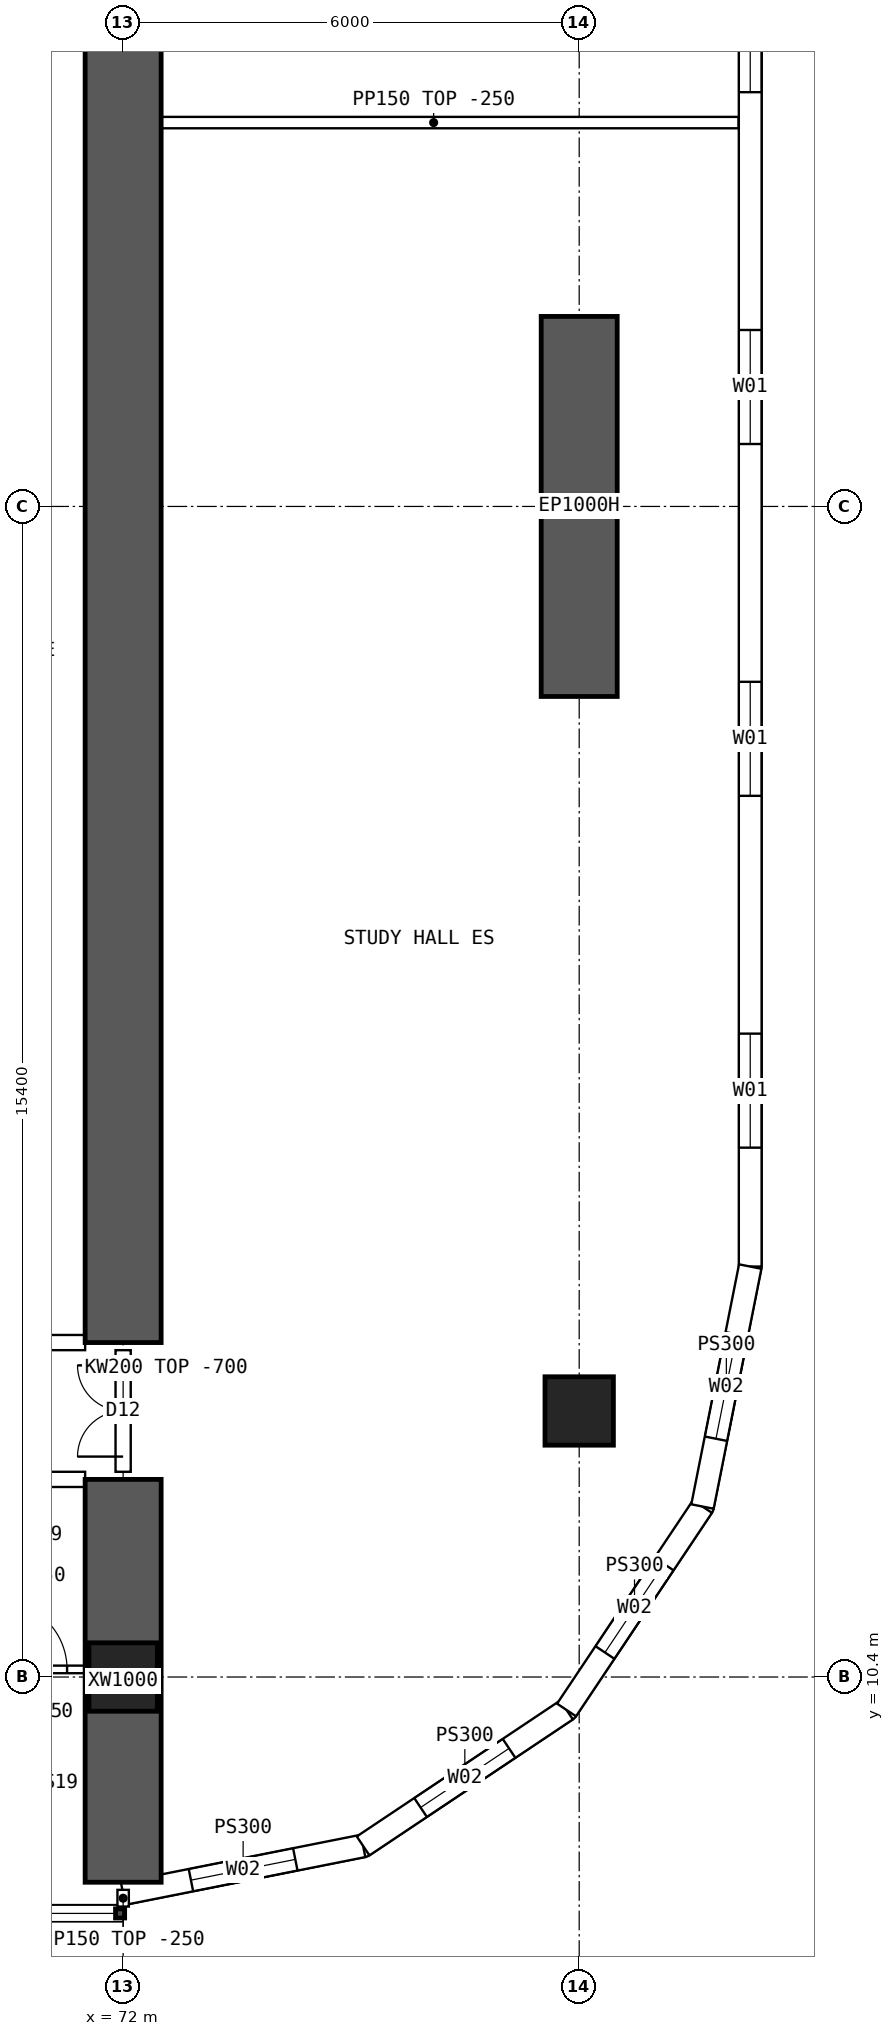
"""IFC4 building model, lengths in metres.
Left out: names, types, materials, properties, quantities, classifications, styles, units other than length and angle.
Written with IfcOpenShell. Run it as: python <this file> out.ifc"""

import sys

from ifc_helpers import new_model, si_unit, direction, frame, frame_2d, origin, origin_2d, place, context, subcontext, project, spatial, polyline, rectangle, hollow_rectangle, outline, extrude, element, fill, save


model = new_model("IFC4")
c1 = context("Model", 3, precision=1e-05, world=origin(), true_north=direction((0.0, 1.0)))
c2 = subcontext(c1, "Body", "Model", "MODEL_VIEW")
j1 = project(units=[si_unit("LENGTHUNIT", "METRE"), si_unit("PLANEANGLEUNIT", "RADIAN")], contexts=[c1])
p1 = place(None, origin())
s1 = spatial("IfcSite", under=j1, at=p1, CompositionType="ELEMENT")
p2 = place(p1, origin())
s2 = spatial("IfcBuilding", under=s1, at=p2, CompositionType="ELEMENT")
p3 = place(p2, frame((0.0, 0.0, 27.7)))
s3 = spatial("IfcBuildingStorey", under=s2, at=p3, CompositionType="ELEMENT", Elevation=27.7)
for number, where, z_axis, x_axis in (
    (1, (72.0, 10.4, 0.0), (0.0, 0.0, 1.0), (1.0, 0.0, 0.0)),
    (2, (78.0, 13.9, 0.0), (0.0, 0.0, 1.0), (1.0, 0.0, 0.0)),
):
    element("IfcColumn", number, at=place(p3, frame(where, z_axis=z_axis, x_axis=x_axis)), inside=s3, PredefinedType="COLUMN", context=c2, shape_type="SweptSolid", body=[
        extrude(hollow_rectangle(XDim=0.9, YDim=0.9, WallThickness=0.09, at=origin_2d()), origin(), (0.0, 0.0, 1.0), 3.75),
    ])
p4 = place(p3, frame((78.0, 23.3, 0.0), z_axis=(0.0, 0.0, 1.0), x_axis=(0.0, 1.0, 0.0)))
e3 = element("IfcWall", 3, at=p4, inside=s3, PredefinedType="SHEAR", context=c2, shape_type="SweptSolid", body=[
    extrude(rectangle(XDim=5.0, YDim=1.0, at=frame_2d((2.5, 0.0))), origin(), (0.0, 0.0, 1.0), 3.75),
])
p5 = place(p3, frame((72.0, 7.7, 0.0), z_axis=(0.0, 0.0, 1.0), x_axis=(0.0, 1.0, 0.0)))
e4 = element("IfcWall", 4, at=p5, inside=s3, PredefinedType="SHEAR", context=c2, shape_type="SweptSolid", body=[
    extrude(rectangle(XDim=5.3, YDim=1.0, at=frame_2d((2.65, 0.0))), origin(), (0.0, 0.0, 1.0), 3.75),
])
p6 = place(p3, frame((72.0, 14.8, 0.0), z_axis=(0.0, 0.0, 1.0), x_axis=(0.0, 1.0, 0.0)))
e5 = element("IfcWall", 5, at=p6, inside=s3, PredefinedType="SHEAR", context=c2, shape_type="SweptSolid", body=[
    extrude(rectangle(XDim=34.4, YDim=1.0, at=frame_2d((17.2, 0.0))), origin(), (0.0, 0.0, 1.0), 3.75),
])
p7 = place(p3, frame((80.25, 15.8, 0.0), z_axis=(0.0, 0.0, 1.0), x_axis=(0.0, 1.0, 0.0)))
e6 = element("IfcWall", 6, at=p7, inside=s3, PredefinedType="SOLIDWALL", context=c2, shape_type="SweptSolid", body=[
    extrude(outline(polyline([(-0.015, -0.15), (32.415, -0.15), (32.385, 0.15), (0.015, 0.15), (-0.015, -0.15)])), origin(), (0.0, 0.0, 1.0), 3.5),
])
p8 = place(p7, frame((1.564, 0.0, 0.9)))
e7 = element("IfcOpeningElement", 7, at=p8, cuts=e6, PredefinedType="OPENING", context=c2, shape_type="SweptSolid", body=[
    extrude(rectangle(XDim=1.5, YDim=2.0, at=frame_2d((0.75, 1.0))), frame((0.0, 0.16, 0.0), z_axis=(0.0, -1.0, 0.0), x_axis=(1.0, 0.0, 0.0)), (0.0, 0.0, 1.0), 0.32),
])
p9 = place(p7, frame((6.193, 0.0, 0.9)))
e8 = element("IfcOpeningElement", 8, at=p9, cuts=e6, PredefinedType="OPENING", context=c2, shape_type="SweptSolid", body=[
    extrude(rectangle(XDim=1.5, YDim=2.0, at=frame_2d((0.75, 1.0))), frame((0.0, 0.16, 0.0), z_axis=(0.0, -1.0, 0.0), x_axis=(1.0, 0.0, 0.0)), (0.0, 0.0, 1.0), 0.32),
])
p10 = place(p7, frame((10.822, 0.0, 0.9)))
e9 = element("IfcOpeningElement", 9, at=p10, cuts=e6, PredefinedType="OPENING", context=c2, shape_type="SweptSolid", body=[
    extrude(rectangle(XDim=1.5, YDim=2.0, at=frame_2d((0.75, 1.0))), frame((0.0, 0.16, 0.0), z_axis=(0.0, -1.0, 0.0), x_axis=(1.0, 0.0, 0.0)), (0.0, 0.0, 1.0), 0.32),
])
p11 = place(p7, frame((15.45, 0.0, 0.9)))
e10 = element("IfcOpeningElement", 10, at=p11, cuts=e6, PredefinedType="OPENING", context=c2, shape_type="SweptSolid", body=[
    extrude(rectangle(XDim=1.5, YDim=2.0, at=frame_2d((0.75, 1.0))), frame((0.0, 0.16, 0.0), z_axis=(0.0, -1.0, 0.0), x_axis=(1.0, 0.0, 0.0)), (0.0, 0.0, 1.0), 0.32),
])
p12 = place(p7, frame((20.079, 0.0, 0.9)))
e11 = element("IfcOpeningElement", 11, at=p12, cuts=e6, PredefinedType="OPENING", context=c2, shape_type="SweptSolid", body=[
    extrude(rectangle(XDim=1.5, YDim=2.0, at=frame_2d((0.75, 1.0))), frame((0.0, 0.16, 0.0), z_axis=(0.0, -1.0, 0.0), x_axis=(1.0, 0.0, 0.0)), (0.0, 0.0, 1.0), 0.32),
])
p13 = place(p7, frame((24.707, 0.0, 0.9)))
e12 = element("IfcOpeningElement", 12, at=p13, cuts=e6, PredefinedType="OPENING", context=c2, shape_type="SweptSolid", body=[
    extrude(rectangle(XDim=1.5, YDim=2.0, at=frame_2d((0.75, 1.0))), frame((0.0, 0.16, 0.0), z_axis=(0.0, -1.0, 0.0), x_axis=(1.0, 0.0, 0.0)), (0.0, 0.0, 1.0), 0.32),
])
p14 = place(p7, frame((29.336, 0.0, 0.9)))
e13 = element("IfcOpeningElement", 13, at=p14, cuts=e6, PredefinedType="OPENING", context=c2, shape_type="SweptSolid", body=[
    extrude(rectangle(XDim=1.5, YDim=2.0, at=frame_2d((0.75, 1.0))), frame((0.0, 0.16, 0.0), z_axis=(0.0, -1.0, 0.0), x_axis=(1.0, 0.0, 0.0)), (0.0, 0.0, 1.0), 0.32),
])
p15 = place(p3, frame((72.0, 7.55, 0.0), z_axis=(0.0, 0.0, 1.0), x_axis=(0.980787251524, 0.195080412259, 0.0)))
e14 = element("IfcWall", 14, at=p15, inside=s3, PredefinedType="SOLIDWALL", context=c2, shape_type="SweptSolid", body=[
    extrude(outline(polyline([(-0.03, -0.15), (3.249, -0.15), (3.189, 0.15), (0.03, 0.15), (-0.03, -0.15)])), origin(), (0.0, 0.0, 1.0), 3.5),
])
p16 = place(p15, frame((0.909, 0.0, 0.9)))
e15 = element("IfcOpeningElement", 15, at=p16, cuts=e14, PredefinedType="OPENING", context=c2, shape_type="SweptSolid", body=[
    extrude(rectangle(XDim=1.4, YDim=1.8, at=frame_2d((0.7, 0.9))), frame((0.0, 0.16, 0.0), z_axis=(0.0, -1.0, 0.0), x_axis=(1.0, 0.0, 0.0)), (0.0, 0.0, 1.0), 0.32),
])
p17 = place(p3, frame((75.157, 8.178, 0.0), z_axis=(0.0, 0.0, 1.0), x_axis=(0.831478105043, 0.555557522525, 0.0)))
e16 = element("IfcWall", 16, at=p17, inside=s3, PredefinedType="SOLIDWALL", context=c2, shape_type="SweptSolid", body=[
    extrude(outline(polyline([(-0.03, -0.15), (3.249, -0.15), (3.189, 0.15), (0.03, 0.15), (-0.03, -0.15)])), origin(), (0.0, 0.0, 1.0), 3.5),
])
p18 = place(p17, frame((0.909, 0.0, 0.9)))
e17 = element("IfcOpeningElement", 17, at=p18, cuts=e16, PredefinedType="OPENING", context=c2, shape_type="SweptSolid", body=[
    extrude(rectangle(XDim=1.4, YDim=1.8, at=frame_2d((0.7, 0.9))), frame((0.0, 0.16, 0.0), z_axis=(0.0, -1.0, 0.0), x_axis=(1.0, 0.0, 0.0)), (0.0, 0.0, 1.0), 0.32),
])
p19 = place(p3, frame((77.833, 9.966, 0.0), z_axis=(0.0, 0.0, 1.0), x_axis=(0.555609954424, 0.831443069936, 0.0)))
e18 = element("IfcWall", 18, at=p19, inside=s3, PredefinedType="SOLIDWALL", context=c2, shape_type="SweptSolid", body=[
    extrude(outline(polyline([(-0.03, -0.15), (3.249, -0.15), (3.189, 0.15), (0.03, 0.15), (-0.03, -0.15)])), origin(), (0.0, 0.0, 1.0), 3.5),
])
p20 = place(p19, frame((0.909, 0.0, 0.9)))
e19 = element("IfcOpeningElement", 19, at=p20, cuts=e18, PredefinedType="OPENING", context=c2, shape_type="SweptSolid", body=[
    extrude(rectangle(XDim=1.4, YDim=1.8, at=frame_2d((0.7, 0.9))), frame((0.0, 0.16, 0.0), z_axis=(0.0, -1.0, 0.0), x_axis=(1.0, 0.0, 0.0)), (0.0, 0.0, 1.0), 0.32),
])
p21 = place(p3, frame((79.622, 12.643, 0.0), z_axis=(0.0, 0.0, 1.0), x_axis=(0.195065901187, 0.980790137692, 0.0)))
e20 = element("IfcWall", 20, at=p21, inside=s3, PredefinedType="SOLIDWALL", context=c2, shape_type="SweptSolid", body=[
    extrude(outline(polyline([(-0.03, -0.15), (3.234, -0.15), (3.204, 0.15), (0.03, 0.15), (-0.03, -0.15)])), origin(), (0.0, 0.0, 1.0), 3.5),
])
p22 = place(p21, frame((0.909, 0.0, 0.9)))
e21 = element("IfcOpeningElement", 21, at=p22, cuts=e20, PredefinedType="OPENING", context=c2, shape_type="SweptSolid", body=[
    extrude(rectangle(XDim=1.4, YDim=1.8, at=frame_2d((0.7, 0.9))), frame((0.0, 0.16, 0.0), z_axis=(0.0, -1.0, 0.0), x_axis=(1.0, 0.0, 0.0)), (0.0, 0.0, 1.0), 0.32),
])
p23 = place(p3, frame((66.5, 13.0, 0.0), z_axis=(0.0, 0.0, 1.0), x_axis=(1.0, 0.0, 0.0)))
e22 = element("IfcWall", 22, at=p23, inside=s3, PredefinedType="SOLIDWALL", context=c2, shape_type="SweptSolid", body=[
    extrude(outline(polyline([(0.0, 0.0), (5.0, 0.0), (5.0, 3.1), (0.0, 3.1), (0.0, 0.0)])), frame((0.0, 0.1, 0.0), z_axis=(0.0, -1.0, 0.0), x_axis=(1.0, 0.0, 0.0)), (0.0, 0.0, 1.0), 0.2),
])
p24 = place(p23, frame((1.425, 0.0, 0.0)))
e23 = element("IfcOpeningElement", 23, at=p24, cuts=e22, PredefinedType="OPENING", context=c2, shape_type="SweptSolid", body=[
    extrude(rectangle(XDim=0.9, YDim=2.1, at=frame_2d((0.45, 1.05))), frame((0.0, 0.11, 0.0), z_axis=(0.0, -1.0, 0.0), x_axis=(1.0, 0.0, 0.0)), (0.0, 0.0, 1.0), 0.22),
])
p25 = place(p23, frame((2.675, 0.0, 0.0)))
e24 = element("IfcOpeningElement", 24, at=p25, cuts=e22, PredefinedType="OPENING", context=c2, shape_type="SweptSolid", body=[
    extrude(rectangle(XDim=0.9, YDim=2.1, at=frame_2d((0.45, 1.05))), frame((0.0, 0.11, 0.0), z_axis=(0.0, -1.0, 0.0), x_axis=(1.0, 0.0, 0.0)), (0.0, 0.0, 1.0), 0.22),
])
p26 = place(p3, frame((66.5, 14.8, 0.0), z_axis=(0.0, 0.0, 1.0), x_axis=(1.0, 0.0, 0.0)))
e25 = element("IfcWall", 25, at=p26, inside=s3, PredefinedType="SOLIDWALL", context=c2, shape_type="SweptSolid", body=[
    extrude(rectangle(XDim=5.0, YDim=0.2, at=frame_2d((2.5, 0.0))), origin(), (0.0, 0.0, 1.0), 3.5),
])
p27 = place(p26, frame((0.2, 0.0, 0.0)))
e26 = element("IfcOpeningElement", 26, at=p27, cuts=e25, PredefinedType="OPENING", context=c2, shape_type="SweptSolid", body=[
    extrude(rectangle(XDim=1.6, YDim=2.1, at=frame_2d((0.8, 1.05))), frame((0.0, 0.11, 0.0), z_axis=(0.0, -1.0, 0.0), x_axis=(1.0, 0.0, 0.0)), (0.0, 0.0, 1.0), 0.22),
])
p28 = place(p3, frame((71.55, 10.5, 0.0), z_axis=(0.0, 0.0, 1.0), x_axis=(-1.0, 0.0, 0.0)))
e27 = element("IfcWall", 27, at=p28, inside=s3, PredefinedType="PARTITIONING", context=c2, shape_type="SweptSolid", body=[
    extrude(outline(polyline([(0.0, 0.0), (1.425, 0.0), (1.425, 3.1), (0.0, 3.1), (0.0, 0.0)])), frame((0.0, 0.05, 0.0), z_axis=(0.0, -1.0, 0.0), x_axis=(1.0, 0.0, 0.0)), (0.0, 0.0, 1.0), 0.1),
])
p29 = place(p28, frame((0.288, 0.0, 0.0)))
e28 = element("IfcOpeningElement", 28, at=p29, cuts=e27, PredefinedType="OPENING", context=c2, shape_type="SweptSolid", body=[
    extrude(rectangle(XDim=0.9, YDim=2.1, at=frame_2d((0.45, 1.05))), frame((0.0, 0.06, 0.0), z_axis=(0.0, -1.0, 0.0), x_axis=(1.0, 0.0, 0.0)), (0.0, 0.0, 1.0), 0.12),
])
p30 = place(p3, frame((72.075, 30.85, 0.0), z_axis=(0.0, 0.0, 1.0), x_axis=(1.0, 0.0, 0.0)))
e29 = element("IfcWall", 29, at=p30, inside=s3, PredefinedType="PARTITIONING", context=c2, shape_type="SweptSolid", body=[
    extrude(outline(polyline([(0.0, 0.0), (8.02, 0.0), (8.02, 3.5), (6.227, 3.5), (6.225, 3.05), (5.627, 3.05), (5.625, 3.5), (0.0, 3.5), (0.0, 0.0)])), frame((0.0, 0.075, 0.0), z_axis=(0.0, -1.0, 0.0), x_axis=(1.0, 0.0, 0.0)), (0.0, 0.0, 1.0), 0.15),
])
p31 = place(p3, frame((72.0, 13.1, 0.0), z_axis=(0.0, 0.0, 1.0), x_axis=(0.0, 1.0, 0.0)))
e30 = element("IfcWall", 30, at=p31, inside=s3, PredefinedType="SOLIDWALL", context=c2, shape_type="SweptSolid", body=[
    extrude(outline(polyline([(0.0, 0.0), (1.6, 0.0), (1.6, 3.05), (0.0, 3.05), (0.0, 0.0)])), frame((0.0, 0.1, 0.0), z_axis=(0.0, -1.0, 0.0), x_axis=(1.0, 0.0, 0.0)), (0.0, 0.0, 1.0), 0.2),
])
p32 = place(p31, frame((0.2, 0.0, 0.0)))
e31 = element("IfcOpeningElement", 31, at=p32, cuts=e30, PredefinedType="OPENING", context=c2, shape_type="SweptSolid", body=[
    extrude(rectangle(XDim=1.2, YDim=2.1, at=frame_2d((0.6, 1.05))), frame((0.0, 0.11, 0.0), z_axis=(0.0, -1.0, 0.0), x_axis=(1.0, 0.0, 0.0)), (0.0, 0.0, 1.0), 0.22),
])
p33 = place(p3, frame((72.0, 7.6, 0.0), z_axis=(0.0, 0.0, 1.0), x_axis=(0.0, -1.0, 0.0)))
e32 = element("IfcWall", 32, at=p33, inside=s3, PredefinedType="PARTITIONING", context=c2, shape_type="SweptSolid", body=[
    extrude(rectangle(XDim=0.22, YDim=0.15, at=frame_2d((0.11, 0.0))), origin(), (0.0, 0.0, 1.0), 3.5),
])
p34 = place(p8, origin())
e33 = element("IfcWindow", 33, at=p34, inside=s3, PartitioningType="SINGLE_PANEL", PredefinedType="WINDOW", context=c2, shape_type="SweptSolid", body=[
    extrude(rectangle(XDim=1.5, YDim=2.0, at=frame_2d((0.75, 1.0))), frame((0.0, 0.03, 0.0), z_axis=(0.0, -1.0, 0.0), x_axis=(1.0, 0.0, 0.0)), (0.0, 0.0, 1.0), 0.06),
])
fill(e7, e33)
p35 = place(p9, origin())
e34 = element("IfcWindow", 34, at=p35, inside=s3, PartitioningType="SINGLE_PANEL", PredefinedType="WINDOW", context=c2, shape_type="SweptSolid", body=[
    extrude(rectangle(XDim=1.5, YDim=2.0, at=frame_2d((0.75, 1.0))), frame((0.0, 0.03, 0.0), z_axis=(0.0, -1.0, 0.0), x_axis=(1.0, 0.0, 0.0)), (0.0, 0.0, 1.0), 0.06),
])
fill(e8, e34)
p36 = place(p10, origin())
e35 = element("IfcWindow", 35, at=p36, inside=s3, PartitioningType="SINGLE_PANEL", PredefinedType="WINDOW", context=c2, shape_type="SweptSolid", body=[
    extrude(rectangle(XDim=1.5, YDim=2.0, at=frame_2d((0.75, 1.0))), frame((0.0, 0.03, 0.0), z_axis=(0.0, -1.0, 0.0), x_axis=(1.0, 0.0, 0.0)), (0.0, 0.0, 1.0), 0.06),
])
fill(e9, e35)
p37 = place(p11, origin())
e36 = element("IfcWindow", 36, at=p37, inside=s3, PartitioningType="SINGLE_PANEL", PredefinedType="WINDOW", context=c2, shape_type="SweptSolid", body=[
    extrude(rectangle(XDim=1.5, YDim=2.0, at=frame_2d((0.75, 1.0))), frame((0.0, 0.03, 0.0), z_axis=(0.0, -1.0, 0.0), x_axis=(1.0, 0.0, 0.0)), (0.0, 0.0, 1.0), 0.06),
])
fill(e10, e36)
p38 = place(p16, origin())
e37 = element("IfcWindow", 37, at=p38, inside=s3, PartitioningType="SINGLE_PANEL", PredefinedType="WINDOW", context=c2, shape_type="SweptSolid", body=[
    extrude(rectangle(XDim=1.4, YDim=1.8, at=frame_2d((0.7, 0.9))), frame((0.0, 0.03, 0.0), z_axis=(0.0, -1.0, 0.0), x_axis=(1.0, 0.0, 0.0)), (0.0, 0.0, 1.0), 0.06),
])
fill(e15, e37)
p39 = place(p18, origin())
e38 = element("IfcWindow", 38, at=p39, inside=s3, PartitioningType="SINGLE_PANEL", PredefinedType="WINDOW", context=c2, shape_type="SweptSolid", body=[
    extrude(rectangle(XDim=1.4, YDim=1.8, at=frame_2d((0.7, 0.9))), frame((0.0, 0.03, 0.0), z_axis=(0.0, -1.0, 0.0), x_axis=(1.0, 0.0, 0.0)), (0.0, 0.0, 1.0), 0.06),
])
fill(e17, e38)
p40 = place(p20, origin())
e39 = element("IfcWindow", 39, at=p40, inside=s3, PartitioningType="SINGLE_PANEL", PredefinedType="WINDOW", context=c2, shape_type="SweptSolid", body=[
    extrude(rectangle(XDim=1.4, YDim=1.8, at=frame_2d((0.7, 0.9))), frame((0.0, 0.03, 0.0), z_axis=(0.0, -1.0, 0.0), x_axis=(1.0, 0.0, 0.0)), (0.0, 0.0, 1.0), 0.06),
])
fill(e19, e39)
p41 = place(p22, origin())
e40 = element("IfcWindow", 40, at=p41, inside=s3, PartitioningType="SINGLE_PANEL", PredefinedType="WINDOW", context=c2, shape_type="SweptSolid", body=[
    extrude(rectangle(XDim=1.4, YDim=1.8, at=frame_2d((0.7, 0.9))), frame((0.0, 0.03, 0.0), z_axis=(0.0, -1.0, 0.0), x_axis=(1.0, 0.0, 0.0)), (0.0, 0.0, 1.0), 0.06),
])
fill(e21, e40)
p42 = place(p29, origin())
e41 = element("IfcDoor", 41, at=p42, inside=s3, OperationType="SINGLE_SWING_RIGHT", PredefinedType="DOOR", context=c2, shape_type="SweptSolid", body=[
    extrude(rectangle(XDim=0.9, YDim=2.1, at=frame_2d((0.45, 1.05))), frame((0.0, 0.025, 0.0), z_axis=(0.0, -1.0, 0.0), x_axis=(1.0, 0.0, 0.0)), (0.0, 0.0, 1.0), 0.05),
])
fill(e28, e41)
p43 = place(p32, origin())
e42 = element("IfcDoor", 42, at=p43, inside=s3, OperationType="DOUBLE_DOOR_SINGLE_SWING", PredefinedType="DOOR", context=c2, shape_type="SweptSolid", body=[
    extrude(rectangle(XDim=1.2, YDim=2.1, at=frame_2d((0.6, 1.05))), frame((0.0, 0.025, 0.0), z_axis=(0.0, -1.0, 0.0), x_axis=(1.0, 0.0, 0.0)), (0.0, 0.0, 1.0), 0.05),
])
fill(e31, e42)
save(model, sys.argv[1])
